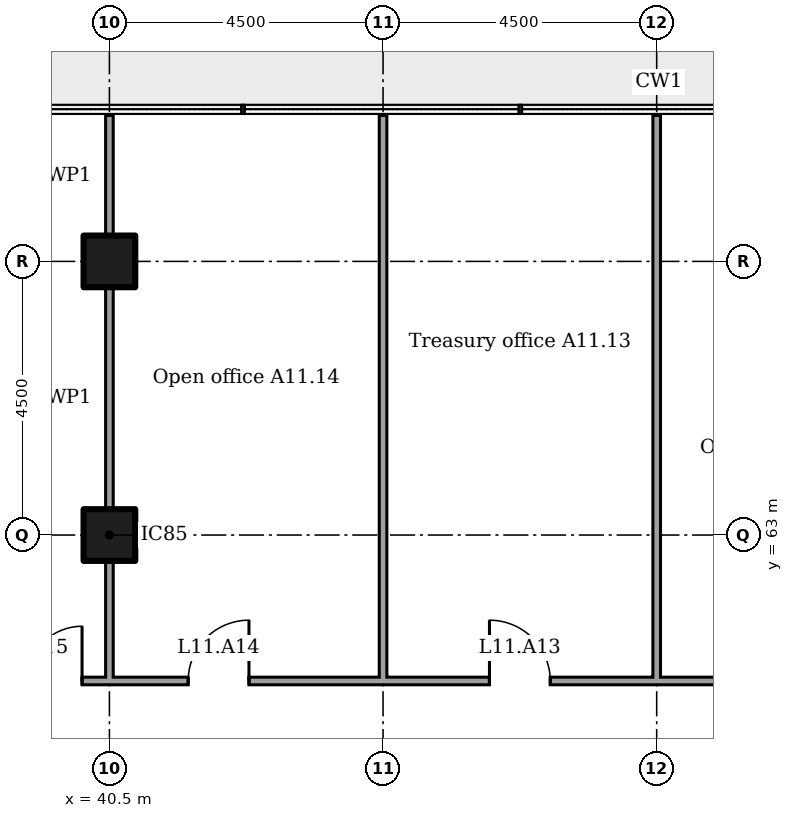
"""IFC4 building model, lengths in metres.
Left out: names, types, materials, properties, quantities, classifications, styles, units other than length and angle.
Written with IfcOpenShell. Run it as: python <this file> out.ifc"""

import sys

from ifc_helpers import new_model, si_unit, direction, frame, frame_2d, origin, origin_2d, place, context, subcontext, project, spatial, rectangle, extrude, element, fill, save


model = new_model("IFC4")
c1 = context("Model", 3, precision=1e-05, world=origin(), true_north=direction((0.0, 1.0)))
c2 = subcontext(c1, "Body", "Model", "MODEL_VIEW")
j1 = project(units=[si_unit("LENGTHUNIT", "METRE"), si_unit("PLANEANGLEUNIT", "RADIAN")], contexts=[c1])
p1 = place(None, origin())
s1 = spatial("IfcSite", under=j1, at=p1, CompositionType="ELEMENT")
p2 = place(p1, origin())
s2 = spatial("IfcBuilding", under=s1, at=p2, CompositionType="ELEMENT")
p3 = place(p2, frame((0.0, 0.0, 51.0)))
s3 = spatial("IfcBuildingStorey", under=s2, at=p3, CompositionType="ELEMENT", Elevation=51.0)
for number, where in (
    (1, (40.5, 63.0, 0.0)),
    (2, (40.5, 67.5, 0.0)),
):
    element("IfcColumn", number, at=place(p3, frame(where)), inside=s3, PredefinedType="COLUMN", context=c2, shape_type="SweptSolid", body=[
        extrude(rectangle(XDim=0.85, YDim=0.85, at=origin_2d()), origin(), (0.0, 0.0, 1.0), 3.6),
    ])
p4 = place(p3, frame((37.738, 60.6, 0.0)))
e3 = element("IfcWall", 3, at=p4, inside=s3, PredefinedType="PARTITIONING", context=c2, shape_type="SweptSolid", body=[
    extrude(rectangle(XDim=23.525, YDim=0.125, at=frame_2d((11.762, 0.0))), origin(), (0.0, 0.0, 1.0), 3.45),
])
p5 = place(p4, frame((21.212, 0.0, 0.0)))
e4 = element("IfcOpeningElement", 4, at=p5, cuts=e3, PredefinedType="OPENING", context=c2, shape_type="SweptSolid", body=[
    extrude(rectangle(XDim=1.8, YDim=2.1, at=frame_2d((0.9, 1.05))), frame((0.0, 0.073, 0.0), z_axis=(0.0, -1.0, 0.0), x_axis=(1.0, 0.0, 0.0)), (0.0, 0.0, 1.0), 0.145),
])
p6 = place(p4, frame((17.558, 0.0, 0.0)))
e5 = element("IfcOpeningElement", 5, at=p6, cuts=e3, PredefinedType="OPENING", context=c2, shape_type="SweptSolid", body=[
    extrude(rectangle(XDim=1.0, YDim=2.1, at=frame_2d((0.5, 1.05))), frame((0.0, 0.073, 0.0), z_axis=(0.0, -1.0, 0.0), x_axis=(1.0, 0.0, 0.0)), (0.0, 0.0, 1.0), 0.145),
])
p7 = place(p4, frame((13.968, 0.0, 0.0)))
e6 = element("IfcOpeningElement", 6, at=p7, cuts=e3, PredefinedType="OPENING", context=c2, shape_type="SweptSolid", body=[
    extrude(rectangle(XDim=1.0, YDim=2.1, at=frame_2d((0.5, 1.05))), frame((0.0, 0.073, 0.0), z_axis=(0.0, -1.0, 0.0), x_axis=(1.0, 0.0, 0.0)), (0.0, 0.0, 1.0), 0.145),
])
p8 = place(p4, frame((9.012, 0.0, 0.0)))
e7 = element("IfcOpeningElement", 7, at=p8, cuts=e3, PredefinedType="OPENING", context=c2, shape_type="SweptSolid", body=[
    extrude(rectangle(XDim=1.0, YDim=2.1, at=frame_2d((0.5, 1.05))), frame((0.0, 0.073, 0.0), z_axis=(0.0, -1.0, 0.0), x_axis=(1.0, 0.0, 0.0)), (0.0, 0.0, 1.0), 0.145),
])
p9 = place(p4, frame((4.058, 0.0, 0.0)))
e8 = element("IfcOpeningElement", 8, at=p9, cuts=e3, PredefinedType="OPENING", context=c2, shape_type="SweptSolid", body=[
    extrude(rectangle(XDim=1.0, YDim=2.1, at=frame_2d((0.5, 1.05))), frame((0.0, 0.073, 0.0), z_axis=(0.0, -1.0, 0.0), x_axis=(1.0, 0.0, 0.0)), (0.0, 0.0, 1.0), 0.145),
])
p10 = place(p4, frame((0.512, 0.0, 0.0)))
e9 = element("IfcOpeningElement", 9, at=p10, cuts=e3, PredefinedType="OPENING", context=c2, shape_type="SweptSolid", body=[
    extrude(rectangle(XDim=1.8, YDim=2.1, at=frame_2d((0.9, 1.05))), frame((0.0, 0.073, 0.0), z_axis=(0.0, -1.0, 0.0), x_axis=(1.0, 0.0, 0.0)), (0.0, 0.0, 1.0), 0.145),
])
p11 = place(p3, frame((40.5, 60.6, 0.0), z_axis=(0.0, 0.0, 1.0), x_axis=(0.0, 1.0, 0.0)))
e10 = element("IfcWall", 10, at=p11, inside=s3, PredefinedType="PARTITIONING", context=c2, shape_type="SweptSolid", body=[
    extrude(rectangle(XDim=1.975, YDim=0.125, at=frame_2d((0.987, 0.0))), origin(), (0.0, 0.0, 1.0), 2.676),
])
p12 = place(p3, frame((40.5, 63.425, 0.0), z_axis=(0.0, 0.0, 1.0), x_axis=(0.0, 1.0, 0.0)))
e11 = element("IfcWall", 11, at=p12, inside=s3, PredefinedType="PARTITIONING", context=c2, shape_type="SweptSolid", body=[
    extrude(rectangle(XDim=3.65, YDim=0.125, at=frame_2d((1.825, 0.0))), origin(), (0.0, 0.0, 1.0), 2.676),
])
p13 = place(p3, frame((40.5, 67.925, 0.0), z_axis=(0.0, 0.0, 1.0), x_axis=(0.0, 1.0, 0.0)))
e12 = element("IfcWall", 12, at=p13, inside=s3, PredefinedType="PARTITIONING", context=c2, shape_type="SweptSolid", body=[
    extrude(rectangle(XDim=1.975, YDim=0.125, at=frame_2d((0.987, 0.0))), origin(), (0.0, 0.0, 1.0), 2.676),
])
for number, where, z_axis, x_axis in (
    (13, (45.0, 60.6, 0.0), (0.0, 0.0, 1.0), (0.0, 1.0, 0.0)),
    (14, (49.5, 60.6, 0.0), (0.0, 0.0, 1.0), (0.0, 1.0, 0.0)),
):
    element("IfcWall", number, at=place(p3, frame(where, z_axis=z_axis, x_axis=x_axis)), inside=s3, PredefinedType="PARTITIONING", context=c2, shape_type="SweptSolid", body=[
        extrude(rectangle(XDim=9.3, YDim=0.125, at=frame_2d((4.65, 0.0))), origin(), (0.0, 0.0, 1.0), 2.766),
    ])
p14 = place(p8, origin())
e15 = element("IfcDoor", 15, at=p14, inside=s3, OperationType="SINGLE_SWING_RIGHT", PredefinedType="DOOR", context=c2, shape_type="SweptSolid", body=[
    extrude(rectangle(XDim=1.0, YDim=2.1, at=frame_2d((0.5, 1.05))), frame((0.0, 0.025, 0.0), z_axis=(0.0, -1.0, 0.0), x_axis=(1.0, 0.0, 0.0)), (0.0, 0.0, 1.0), 0.05),
])
fill(e7, e15)
p15 = place(p9, origin())
e16 = element("IfcDoor", 16, at=p15, inside=s3, OperationType="SINGLE_SWING_LEFT", PredefinedType="DOOR", context=c2, shape_type="SweptSolid", body=[
    extrude(rectangle(XDim=1.0, YDim=2.1, at=frame_2d((0.5, 1.05))), frame((0.0, 0.025, 0.0), z_axis=(0.0, -1.0, 0.0), x_axis=(1.0, 0.0, 0.0)), (0.0, 0.0, 1.0), 0.05),
])
fill(e8, e16)
p16 = place(p10, origin())
e17 = element("IfcDoor", 17, at=p16, inside=s3, OperationType="DOUBLE_DOOR_SINGLE_SWING", PredefinedType="DOOR", context=c2, shape_type="SweptSolid", body=[
    extrude(rectangle(XDim=1.8, YDim=2.1, at=frame_2d((0.9, 1.05))), frame((0.0, 0.025, 0.0), z_axis=(0.0, -1.0, 0.0), x_axis=(1.0, 0.0, 0.0)), (0.0, 0.0, 1.0), 0.05),
])
fill(e9, e17)
save(model, sys.argv[1])
